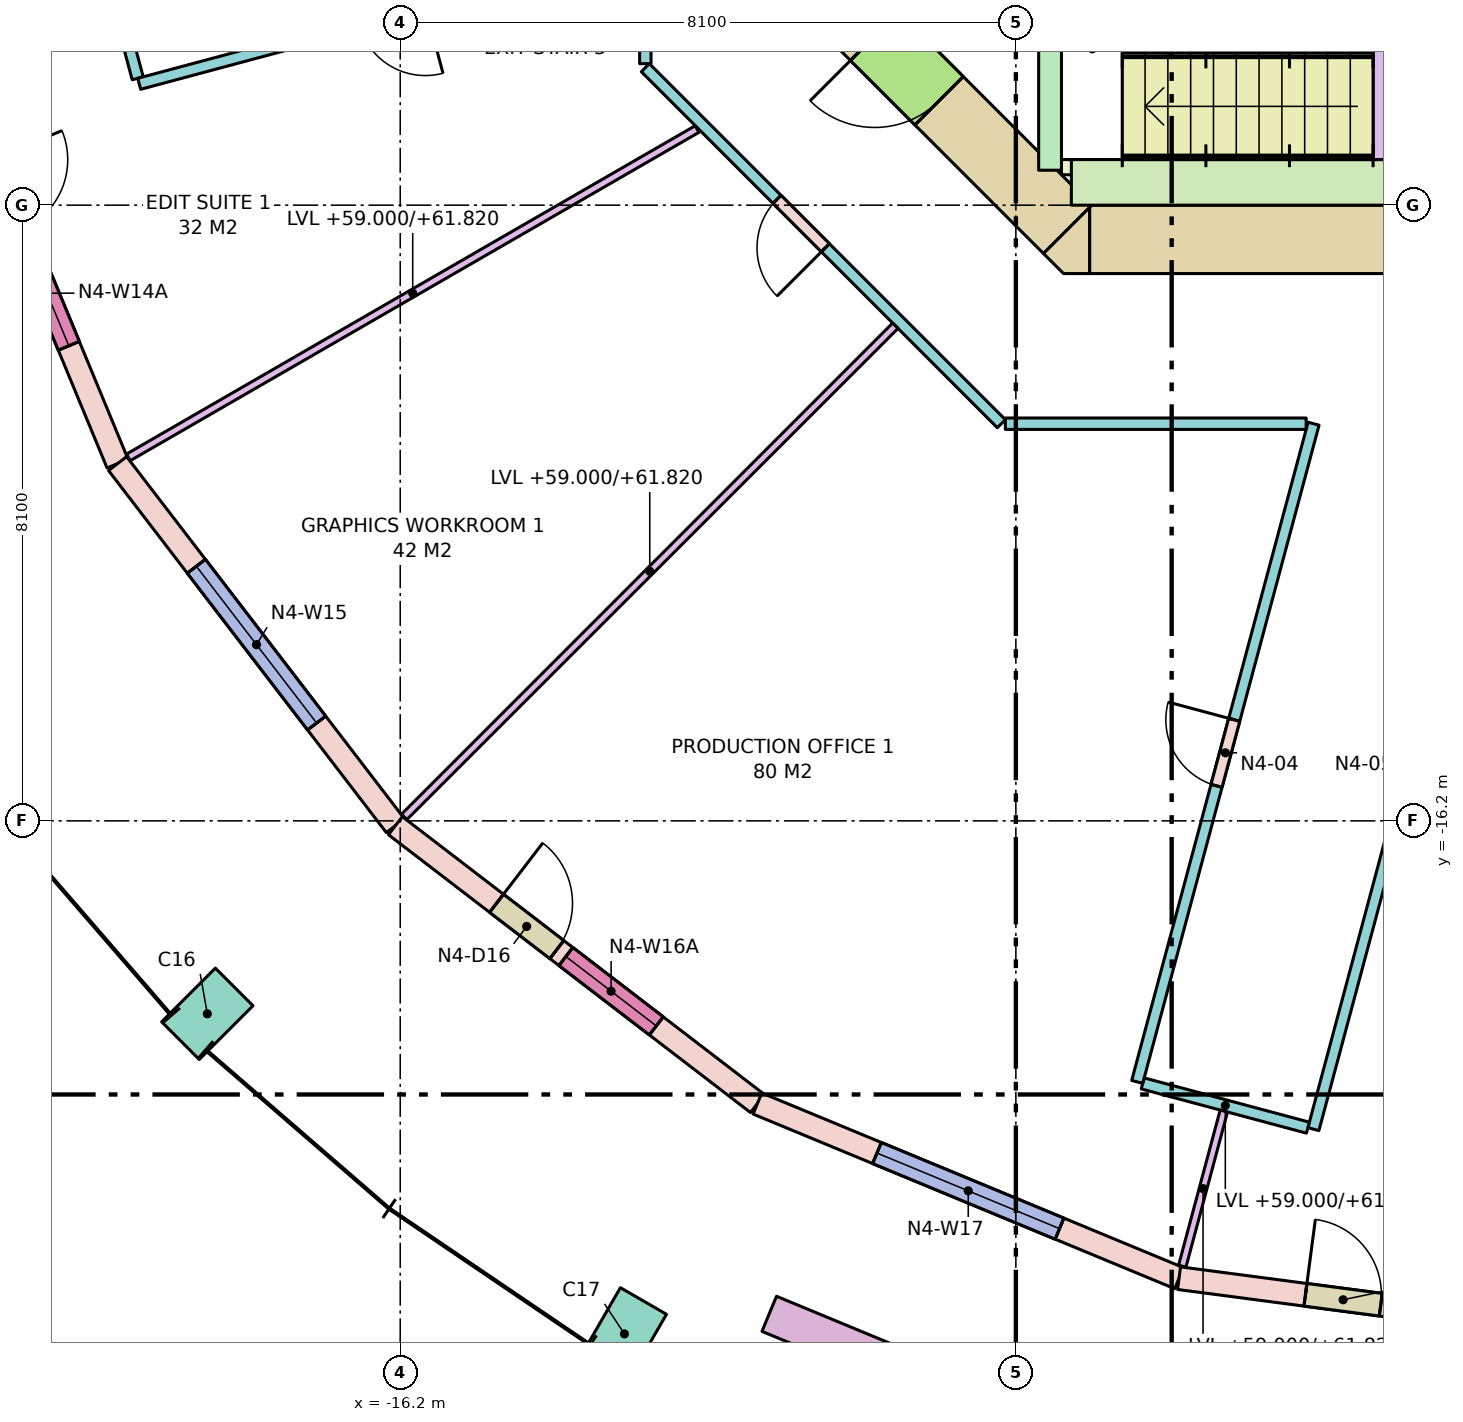
"""IFC4 building model, lengths in metres.
Left out: names, types, materials, properties, quantities, classifications, styles, units other than length and angle.
Written with IfcOpenShell. Run it as: python <this file> out.ifc"""

import sys

from ifc_helpers import new_model, si_unit, direction, frame, frame_2d, origin, origin_2d, place, context, subcontext, project, spatial, polyline, rectangle, outline, extrude, element, fill, save


model = new_model("IFC4")
c1 = context("Model", 3, precision=1e-05, world=origin(), true_north=direction((0.0, 1.0)))
c2 = subcontext(c1, "Body", "Model", "MODEL_VIEW")
j1 = project(units=[si_unit("LENGTHUNIT", "METRE"), si_unit("PLANEANGLEUNIT", "RADIAN")], contexts=[c1])
p1 = place(None, origin())
s1 = spatial("IfcSite", under=j1, at=p1, CompositionType="ELEMENT")
p2 = place(p1, origin())
s2 = spatial("IfcBuilding", under=s1, at=p2, CompositionType="ELEMENT")
p3 = place(p2, frame((0.0, 0.0, 59.0)))
s3 = spatial("IfcBuildingStorey", under=s2, at=p3, CompositionType="ELEMENT", Elevation=59.0)
for number, where, z_axis, x_axis in (
    (1, (-18.738, -18.738, 0.0), (0.0, 0.0, 1.0), (0.707, -0.707, 0.0)),
    (2, (-13.25, -22.95, 0.0), (0.0, 0.0, 1.0), (0.866, -0.5, 0.0)),
):
    element("IfcColumn", number, at=place(p3, frame(where, z_axis=z_axis, x_axis=x_axis)), inside=s3, PredefinedType="COLUMN", context=c2, shape_type="SweptSolid", body=[
        extrude(rectangle(XDim=0.7, YDim=1.0, at=origin_2d()), origin(), (0.0, 0.0, 1.0), 4.0),
    ])
p4 = place(p3, frame((-7.13, -8.55, -0.28), z_axis=(0.0, 0.0, 1.0), x_axis=(1.0, 0.0, 0.0)))
e3 = element("IfcWall", 3, at=p4, inside=s3, PredefinedType="SHEAR", context=c2, shape_type="SweptSolid", body=[
    extrude(rectangle(XDim=14.26, YDim=0.9, at=frame_2d((7.13, 0.0))), origin(), (0.0, 0.0, 1.0), 4.0),
])
p5 = place(p4, frame((8.08, 0.0, 0.28)))
e4 = element("IfcOpeningElement", 4, at=p5, cuts=e3, PredefinedType="OPENING", context=c2, shape_type="SweptSolid", body=[
    extrude(rectangle(XDim=0.7, YDim=2.1, at=frame_2d((0.35, 1.05))), frame((0.0, 0.46, 0.0), z_axis=(0.0, -1.0, 0.0), x_axis=(1.0, 0.0, 0.0)), (0.0, 0.0, 1.0), 0.92),
])
p6 = place(p4, frame((6.205, 0.0, 0.28)))
e5 = element("IfcOpeningElement", 5, at=p6, cuts=e3, PredefinedType="OPENING", context=c2, shape_type="SweptSolid", body=[
    extrude(rectangle(XDim=0.9, YDim=2.1, at=frame_2d((0.45, 1.05))), frame((0.0, 0.46, 0.0), z_axis=(0.0, -1.0, 0.0), x_axis=(1.0, 0.0, 0.0)), (0.0, 0.0, 1.0), 0.92),
])
p7 = place(p4, frame((9.445, 0.0, 0.28)))
e6 = element("IfcOpeningElement", 6, at=p7, cuts=e3, PredefinedType="OPENING", context=c2, shape_type="SweptSolid", body=[
    extrude(rectangle(XDim=0.9, YDim=2.1, at=frame_2d((0.45, 1.05))), frame((0.0, 0.46, 0.0), z_axis=(0.0, -1.0, 0.0), x_axis=(1.0, 0.0, 0.0)), (0.0, 0.0, 1.0), 0.92),
])
p8 = place(p4, frame((11.431, 0.0, 0.28)))
e7 = element("IfcOpeningElement", 7, at=p8, cuts=e3, PredefinedType="OPENING", context=c2, shape_type="SweptSolid", body=[
    extrude(rectangle(XDim=0.9, YDim=2.1, at=frame_2d((0.45, 1.05))), frame((0.0, 0.46, 0.0), z_axis=(0.0, -1.0, 0.0), x_axis=(1.0, 0.0, 0.0)), (0.0, 0.0, 1.0), 0.92),
])
p9 = place(p3, frame((-7.418, -8.418, -0.28), z_axis=(0.0, 0.0, 1.0), x_axis=(-0.707106781187, 0.707106781187, 0.0)))
e8 = element("IfcWall", 8, at=p9, inside=s3, PredefinedType="SHEAR", context=c2, shape_type="SweptSolid", body=[
    extrude(rectangle(XDim=4.243, YDim=0.9, at=frame_2d((2.121, 0.0))), origin(), (0.0, 0.0, 1.0), 4.0),
])
p10 = place(p9, frame((2.393, 0.0, 0.28)))
e9 = element("IfcOpeningElement", 9, at=p10, cuts=e8, PredefinedType="OPENING", context=c2, shape_type="SweptSolid", body=[
    extrude(rectangle(XDim=1.2, YDim=2.1, at=frame_2d((0.6, 1.05))), frame((0.0, 0.46, 0.0), z_axis=(0.0, -1.0, 0.0), x_axis=(1.0, 0.0, 0.0)), (0.0, 0.0, 1.0), 0.92),
])
p11 = place(p3, frame((0.0, 0.0, -0.28)))
e10 = element("IfcWall", 10, at=p11, inside=s3, PredefinedType="SHEAR", context=c2, shape_type="SweptSolid", body=[
    extrude(outline(polyline([(-7.473, -9.0), (-7.736, -8.736), (-7.13, -8.13), (-7.13, -9.0), (-7.473, -9.0)])), origin(), (0.0, 0.0, 1.0), 4.0),
])
p12 = place(p3, frame((-7.65, -7.64, 0.0), z_axis=(0.0, 0.0, 1.0), x_axis=(0.0, 1.0, 0.0)))
e11 = element("IfcWall", 11, at=p12, inside=s3, PredefinedType="SHEAR", context=c2, shape_type="SweptSolid", body=[
    extrude(rectangle(XDim=3.14, YDim=0.3, at=frame_2d((1.57, 0.0))), origin(), (0.0, 0.0, 1.0), 3.72),
])
p13 = place(p12, frame((1.68, 0.0, 0.0)))
e12 = element("IfcOpeningElement", 12, at=p13, cuts=e11, PredefinedType="OPENING", context=c2, shape_type="SweptSolid", body=[
    extrude(rectangle(XDim=1.32, YDim=2.1, at=frame_2d((0.66, 1.05))), frame((0.0, 0.16, 0.0), z_axis=(0.0, -1.0, 0.0), x_axis=(1.0, 0.0, 0.0)), (0.0, 0.0, 1.0), 0.32),
])
p14 = place(p3, frame((-7.5, -7.6, 0.0), z_axis=(0.0, 0.0, 1.0), x_axis=(1.0, 0.0, 0.0)))
e13 = element("IfcWall", 13, at=p14, inside=s3, PredefinedType="SHEAR", context=c2, shape_type="SweptSolid", body=[
    extrude(rectangle(XDim=0.6, YDim=0.2, at=frame_2d((0.3, 0.0))), origin(), (0.0, 0.0, 1.0), 3.72),
])
p15 = place(p3, frame((-7.37, -7.8, 0.0), z_axis=(0.0, 0.0, 1.0), x_axis=(1.0, 0.0, 0.0)))
e14 = element("IfcWall", 14, at=p15, inside=s3, PredefinedType="SHEAR", context=c2, shape_type="SweptSolid", body=[
    extrude(rectangle(XDim=5.37, YDim=0.6, at=frame_2d((2.685, 0.0))), origin(), (0.0, 0.0, 1.0), 3.72),
])
p16 = place(p3, frame((-22.216, -5.953, 0.0), z_axis=(0.0, 0.0, 1.0), x_axis=(0.382671411433, -0.923884511653, 0.0)))
e15 = element("IfcWall", 15, at=p16, inside=s3, PredefinedType="STANDARD", context=c2, shape_type="SweptSolid", body=[
    extrude(rectangle(XDim=6.004, YDim=0.3, at=frame_2d((3.002, 0.0))), origin(), (0.0, 0.0, 1.0), 3.72),
])
p17 = place(p16, frame((1.677, 0.0, 0.0)))
e16 = element("IfcOpeningElement", 16, at=p17, cuts=e15, PredefinedType="OPENING", context=c2, shape_type="SweptSolid", body=[
    extrude(rectangle(XDim=1.0, YDim=2.4, at=frame_2d((0.5, 1.2))), frame((0.0, 0.16, 0.0), z_axis=(0.0, -1.0, 0.0), x_axis=(1.0, 0.0, 0.0)), (0.0, 0.0, 1.0), 0.32),
])
p18 = place(p16, frame((2.827, 0.0, 0.8)))
e17 = element("IfcOpeningElement", 17, at=p18, cuts=e15, PredefinedType="OPENING", context=c2, shape_type="SweptSolid", body=[
    extrude(rectangle(XDim=1.5, YDim=2.7, at=frame_2d((0.75, 1.35))), frame((0.0, 0.16, 0.0), z_axis=(0.0, -1.0, 0.0), x_axis=(1.0, 0.0, 0.0)), (0.0, 0.0, 1.0), 0.32),
])
p19 = place(p3, frame((-19.919, -11.5, 0.0), z_axis=(0.0, 0.0, 1.0), x_axis=(0.608778912074, -0.793339924758, 0.0)))
e18 = element("IfcWall", 18, at=p19, inside=s3, PredefinedType="STANDARD", context=c2, shape_type="SweptSolid", body=[
    extrude(rectangle(XDim=6.004, YDim=0.3, at=frame_2d((3.002, 0.0))), origin(), (0.0, 0.0, 1.0), 3.72),
])
p20 = place(p19, frame((1.702, 0.0, 0.8)))
e19 = element("IfcOpeningElement", 19, at=p20, cuts=e18, PredefinedType="OPENING", context=c2, shape_type="SweptSolid", body=[
    extrude(rectangle(XDim=2.6, YDim=2.7, at=frame_2d((1.3, 1.35))), frame((0.0, 0.16, 0.0), z_axis=(0.0, -1.0, 0.0), x_axis=(1.0, 0.0, 0.0)), (0.0, 0.0, 1.0), 0.32),
])
p21 = place(p3, frame((-16.263, -16.263, 0.0), z_axis=(0.0, 0.0, 1.0), x_axis=(0.793339924758, -0.608778912074, 0.0)))
e20 = element("IfcWall", 20, at=p21, inside=s3, PredefinedType="STANDARD", context=c2, shape_type="SweptSolid", body=[
    extrude(rectangle(XDim=6.004, YDim=0.3, at=frame_2d((3.002, 0.0))), origin(), (0.0, 0.0, 1.0), 3.72),
])
p22 = place(p21, frame((1.677, 0.0, 0.0)))
e21 = element("IfcOpeningElement", 21, at=p22, cuts=e20, PredefinedType="OPENING", context=c2, shape_type="SweptSolid", body=[
    extrude(rectangle(XDim=1.0, YDim=2.4, at=frame_2d((0.5, 1.2))), frame((0.0, 0.16, 0.0), z_axis=(0.0, -1.0, 0.0), x_axis=(1.0, 0.0, 0.0)), (0.0, 0.0, 1.0), 0.32),
])
p23 = place(p21, frame((2.827, 0.0, 0.8)))
e22 = element("IfcOpeningElement", 22, at=p23, cuts=e20, PredefinedType="OPENING", context=c2, shape_type="SweptSolid", body=[
    extrude(rectangle(XDim=1.5, YDim=2.7, at=frame_2d((0.75, 1.35))), frame((0.0, 0.16, 0.0), z_axis=(0.0, -1.0, 0.0), x_axis=(1.0, 0.0, 0.0)), (0.0, 0.0, 1.0), 0.32),
])
p24 = place(p3, frame((-11.5, -19.919, 0.0), z_axis=(0.0, 0.0, 1.0), x_axis=(0.923884511653, -0.382671411433, 0.0)))
e23 = element("IfcWall", 23, at=p24, inside=s3, PredefinedType="STANDARD", context=c2, shape_type="SweptSolid", body=[
    extrude(rectangle(XDim=6.004, YDim=0.3, at=frame_2d((3.002, 0.0))), origin(), (0.0, 0.0, 1.0), 3.72),
])
p25 = place(p24, frame((1.702, 0.0, 0.8)))
e24 = element("IfcOpeningElement", 24, at=p25, cuts=e23, PredefinedType="OPENING", context=c2, shape_type="SweptSolid", body=[
    extrude(rectangle(XDim=2.6, YDim=2.7, at=frame_2d((1.3, 1.35))), frame((0.0, 0.16, 0.0), z_axis=(0.0, -1.0, 0.0), x_axis=(1.0, 0.0, 0.0)), (0.0, 0.0, 1.0), 0.32),
])
p26 = place(p3, frame((-5.953, -22.216, 0.0), z_axis=(0.0, 0.0, 1.0), x_axis=(0.991445297315, -0.130522880875, 0.0)))
e25 = element("IfcWall", 25, at=p26, inside=s3, PredefinedType="STANDARD", context=c2, shape_type="SweptSolid", body=[
    extrude(rectangle(XDim=6.004, YDim=0.3, at=frame_2d((3.002, 0.0))), origin(), (0.0, 0.0, 1.0), 3.72),
])
p27 = place(p26, frame((1.677, 0.0, 0.0)))
e26 = element("IfcOpeningElement", 26, at=p27, cuts=e25, PredefinedType="OPENING", context=c2, shape_type="SweptSolid", body=[
    extrude(rectangle(XDim=1.0, YDim=2.4, at=frame_2d((0.5, 1.2))), frame((0.0, 0.16, 0.0), z_axis=(0.0, -1.0, 0.0), x_axis=(1.0, 0.0, 0.0)), (0.0, 0.0, 1.0), 0.32),
])
p28 = place(p26, frame((2.827, 0.0, 0.8)))
e27 = element("IfcOpeningElement", 27, at=p28, cuts=e25, PredefinedType="OPENING", context=c2, shape_type="SweptSolid", body=[
    extrude(rectangle(XDim=1.5, YDim=2.7, at=frame_2d((0.75, 1.35))), frame((0.0, 0.16, 0.0), z_axis=(0.0, -1.0, 0.0), x_axis=(1.0, 0.0, 0.0)), (0.0, 0.0, 1.0), 0.32),
])
p29 = place(p3, frame((-11.345, -22.685, 0.0), z_axis=(0.0, 0.0, 1.0), x_axis=(0.923885420167, -0.382669217998, 0.0)))
e28 = element("IfcWall", 28, at=p29, inside=s3, PredefinedType="PARAPET", context=c2, shape_type="SweptSolid", body=[
    extrude(rectangle(XDim=3.6, YDim=0.5, at=frame_2d((1.8, 0.0))), origin(), (0.0, 0.0, 1.0), 0.9),
])
p30 = place(p3, frame((-19.654, -6.431, 0.0), z_axis=(0.0, 0.0, 1.0), x_axis=(-0.258891558609, 0.965906393436, 0.0)))
e29 = element("IfcWall", 29, at=p30, inside=s3, PredefinedType="PARTITIONING", context=c2, shape_type="SweptSolid", body=[
    extrude(rectangle(XDim=2.25, YDim=0.15, at=frame_2d((1.125, 0.0))), origin(), (0.0, 0.0, 1.0), 2.82),
])
p31 = place(p3, frame((-1.698, -10.975, 0.0), z_axis=(0.0, 0.0, 1.0), x_axis=(-0.258829650889, -0.965922984415, 0.0)))
e30 = element("IfcWall", 30, at=p31, inside=s3, PredefinedType="PARTITIONING", context=c2, shape_type="SweptSolid", body=[
    extrude(rectangle(XDim=9.608, YDim=0.15, at=frame_2d((4.804, 0.0))), origin(), (0.0, 0.0, 1.0), 3.72),
])
p32 = place(p31, frame((3.904, 0.0, 0.0)))
e31 = element("IfcOpeningElement", 31, at=p32, cuts=e30, PredefinedType="OPENING", context=c2, shape_type="SweptSolid", body=[
    extrude(rectangle(XDim=1.8, YDim=2.1, at=frame_2d((0.9, 1.05))), frame((0.0, 0.085, 0.0), z_axis=(0.0, -1.0, 0.0), x_axis=(1.0, 0.0, 0.0)), (0.0, 0.0, 1.0), 0.17),
])
p33 = place(p3, frame((-4.258, -20.236, 0.0), z_axis=(0.0, 0.0, 1.0), x_axis=(-0.965906393436, 0.258891558609, 0.0)))
e32 = element("IfcWall", 32, at=p33, inside=s3, PredefinedType="PARTITIONING", context=c2, shape_type="SweptSolid", body=[
    extrude(rectangle(XDim=2.25, YDim=0.15, at=frame_2d((1.125, 0.0))), origin(), (0.0, 0.0, 1.0), 2.82),
])
p34 = place(p3, frame((-6.503, -19.635, 0.0), z_axis=(0.0, 0.0, 1.0), x_axis=(0.258821842436, 0.965925076742, 0.0)))
e33 = element("IfcWall", 33, at=p34, inside=s3, PredefinedType="PARTITIONING", context=c2, shape_type="SweptSolid", body=[
    extrude(rectangle(XDim=8.965, YDim=0.15, at=frame_2d((4.482, 0.0))), origin(), (0.0, 0.0, 1.0), 3.72),
])
p35 = place(p34, frame((4.032, 0.0, 0.0)))
e34 = element("IfcOpeningElement", 34, at=p35, cuts=e33, PredefinedType="OPENING", context=c2, shape_type="SweptSolid", body=[
    extrude(rectangle(XDim=0.9, YDim=2.1, at=frame_2d((0.45, 1.05))), frame((0.0, 0.085, 0.0), z_axis=(0.0, -1.0, 0.0), x_axis=(1.0, 0.0, 0.0)), (0.0, 0.0, 1.0), 0.17),
])
p36 = place(p3, frame((-4.281, -10.975, 0.0), z_axis=(0.0, 0.0, 1.0), x_axis=(-1.0, 0.0, 0.0)))
e35 = element("IfcWall", 35, at=p36, inside=s3, PredefinedType="PARTITIONING", context=c2, shape_type="SweptSolid", body=[
    extrude(rectangle(XDim=3.958, YDim=0.15, at=frame_2d((1.979, 0.0))), origin(), (0.0, 0.0, 1.0), 2.82),
])
p37 = place(p3, frame((-8.291, -10.975, 0.0), z_axis=(0.0, 0.0, 1.0), x_axis=(-0.707106781187, 0.707106781187, 0.0)))
e36 = element("IfcWall", 36, at=p37, inside=s3, PredefinedType="PARTITIONING", context=c2, shape_type="SweptSolid", body=[
    extrude(rectangle(XDim=6.624, YDim=0.15, at=frame_2d((3.312, 0.0))), origin(), (0.0, 0.0, 1.0), 2.82),
])
p38 = place(p37, frame((3.274, 0.0, 0.0)))
e37 = element("IfcOpeningElement", 37, at=p38, cuts=e36, PredefinedType="OPENING", context=c2, shape_type="SweptSolid", body=[
    extrude(rectangle(XDim=0.9, YDim=2.1, at=frame_2d((0.45, 1.05))), frame((0.0, 0.085, 0.0), z_axis=(0.0, -1.0, 0.0), x_axis=(1.0, 0.0, 0.0)), (0.0, 0.0, 1.0), 0.17),
])
p39 = place(p3, frame((-12.975, -6.238, 0.0), z_axis=(0.0, 0.0, 1.0), x_axis=(0.0, 1.0, 0.0)))
e38 = element("IfcWall", 38, at=p39, inside=s3, PredefinedType="PARTITIONING", context=c2, shape_type="SweptSolid", body=[
    extrude(rectangle(XDim=1.422, YDim=0.15, at=frame_2d((0.711, 0.0))), origin(), (0.0, 0.0, 1.0), 3.72),
])
p40 = place(p3, frame((-12.975, -4.719, 0.0), z_axis=(0.0, 0.0, 1.0), x_axis=(-0.965924499418, -0.258823997003, 0.0)))
e39 = element("IfcWall", 39, at=p40, inside=s3, PredefinedType="PARTITIONING", context=c2, shape_type="SweptSolid", body=[
    extrude(rectangle(XDim=6.894, YDim=0.15, at=frame_2d((3.447, 0.0))), origin(), (0.0, 0.0, 1.0), 3.72),
])
p41 = place(p40, frame((2.997, 0.0, 0.0)))
e40 = element("IfcOpeningElement", 40, at=p41, cuts=e39, PredefinedType="OPENING", context=c2, shape_type="SweptSolid", body=[
    extrude(rectangle(XDim=0.9, YDim=2.1, at=frame_2d((0.45, 1.05))), frame((0.0, 0.085, 0.0), z_axis=(0.0, -1.0, 0.0), x_axis=(1.0, 0.0, 0.0)), (0.0, 0.0, 1.0), 0.17),
])
p42 = place(p3, frame((-12.294, -7.098, 0.0), z_axis=(0.0, 0.0, 1.0), x_axis=(-0.866010547425, -0.500025731086, 0.0)))
e41 = element("IfcWall", 41, at=p42, inside=s3, PredefinedType="PARTITIONING", context=c2, shape_type="SweptSolid", body=[
    extrude(rectangle(XDim=8.641, YDim=0.1, at=frame_2d((4.32, 0.0))), origin(), (0.0, 0.0, 1.0), 2.82),
])
p43 = place(p3, frame((-9.686, -9.686, 0.0), z_axis=(0.0, 0.0, 1.0), x_axis=(-0.707106781187, -0.707106781187, 0.0)))
e42 = element("IfcWall", 42, at=p43, inside=s3, PredefinedType="PARTITIONING", context=c2, shape_type="SweptSolid", body=[
    extrude(rectangle(XDim=9.138, YDim=0.1, at=frame_2d((4.569, 0.0))), origin(), (0.0, 0.0, 1.0), 2.82),
])
p44 = place(p3, frame((-5.364, -20.018, 0.0), z_axis=(0.0, 0.0, 1.0), x_axis=(-0.258813089189, -0.965927422152, 0.0)))
e43 = element("IfcWall", 43, at=p44, inside=s3, PredefinedType="PARTITIONING", context=c2, shape_type="SweptSolid", body=[
    extrude(rectangle(XDim=2.113, YDim=0.1, at=frame_2d((1.057, 0.0))), origin(), (0.0, 0.0, 1.0), 2.82),
])
p45 = place(p18, origin())
e44 = element("IfcWindow", 44, at=p45, inside=s3, PartitioningType="SINGLE_PANEL", PredefinedType="WINDOW", context=c2, shape_type="SweptSolid", body=[
    extrude(rectangle(XDim=1.5, YDim=2.7, at=frame_2d((0.75, 1.35))), frame((0.0, 0.03, 0.0), z_axis=(0.0, -1.0, 0.0), x_axis=(1.0, 0.0, 0.0)), (0.0, 0.0, 1.0), 0.06),
])
fill(e17, e44)
p46 = place(p20, origin())
e45 = element("IfcWindow", 45, at=p46, inside=s3, PartitioningType="SINGLE_PANEL", PredefinedType="WINDOW", context=c2, shape_type="SweptSolid", body=[
    extrude(rectangle(XDim=2.6, YDim=2.7, at=frame_2d((1.3, 1.35))), frame((0.0, 0.03, 0.0), z_axis=(0.0, -1.0, 0.0), x_axis=(1.0, 0.0, 0.0)), (0.0, 0.0, 1.0), 0.06),
])
fill(e19, e45)
p47 = place(p22, origin())
e46 = element("IfcDoor", 46, at=p47, inside=s3, OperationType="SINGLE_SWING_LEFT", PredefinedType="DOOR", context=c2, shape_type="SweptSolid", body=[
    extrude(rectangle(XDim=1.0, YDim=2.4, at=frame_2d((0.5, 1.2))), frame((0.0, 0.025, 0.0), z_axis=(0.0, -1.0, 0.0), x_axis=(1.0, 0.0, 0.0)), (0.0, 0.0, 1.0), 0.05),
])
fill(e21, e46)
p48 = place(p23, origin())
e47 = element("IfcWindow", 47, at=p48, inside=s3, PartitioningType="SINGLE_PANEL", PredefinedType="WINDOW", context=c2, shape_type="SweptSolid", body=[
    extrude(rectangle(XDim=1.5, YDim=2.7, at=frame_2d((0.75, 1.35))), frame((0.0, 0.03, 0.0), z_axis=(0.0, -1.0, 0.0), x_axis=(1.0, 0.0, 0.0)), (0.0, 0.0, 1.0), 0.06),
])
fill(e22, e47)
p49 = place(p25, origin())
e48 = element("IfcWindow", 48, at=p49, inside=s3, PartitioningType="SINGLE_PANEL", PredefinedType="WINDOW", context=c2, shape_type="SweptSolid", body=[
    extrude(rectangle(XDim=2.6, YDim=2.7, at=frame_2d((1.3, 1.35))), frame((0.0, 0.03, 0.0), z_axis=(0.0, -1.0, 0.0), x_axis=(1.0, 0.0, 0.0)), (0.0, 0.0, 1.0), 0.06),
])
fill(e24, e48)
p50 = place(p27, origin())
e49 = element("IfcDoor", 49, at=p50, inside=s3, OperationType="SINGLE_SWING_LEFT", PredefinedType="DOOR", context=c2, shape_type="SweptSolid", body=[
    extrude(rectangle(XDim=1.0, YDim=2.4, at=frame_2d((0.5, 1.2))), frame((0.0, 0.025, 0.0), z_axis=(0.0, -1.0, 0.0), x_axis=(1.0, 0.0, 0.0)), (0.0, 0.0, 1.0), 0.05),
])
fill(e26, e49)
p51 = place(p10, origin())
e50 = element("IfcDoor", 50, at=p51, inside=s3, OperationType="SINGLE_SWING_RIGHT", PredefinedType="DOOR", context=c2, shape_type="SweptSolid", body=[
    extrude(rectangle(XDim=1.2, YDim=2.1, at=frame_2d((0.6, 1.05))), frame((0.0, 0.025, 0.0), z_axis=(0.0, -1.0, 0.0), x_axis=(1.0, 0.0, 0.0)), (0.0, 0.0, 1.0), 0.05),
])
fill(e9, e50)
p52 = place(p38, origin())
e51 = element("IfcDoor", 51, at=p52, inside=s3, OperationType="SINGLE_SWING_LEFT", PredefinedType="DOOR", context=c2, shape_type="SweptSolid", body=[
    extrude(rectangle(XDim=0.9, YDim=2.1, at=frame_2d((0.45, 1.05))), frame((0.0, 0.025, 0.0), z_axis=(0.0, -1.0, 0.0), x_axis=(1.0, 0.0, 0.0)), (0.0, 0.0, 1.0), 0.05),
])
fill(e37, e51)
p53 = place(p35, origin())
e52 = element("IfcDoor", 52, at=p53, inside=s3, OperationType="SINGLE_SWING_RIGHT", PredefinedType="DOOR", context=c2, shape_type="SweptSolid", body=[
    extrude(rectangle(XDim=0.9, YDim=2.1, at=frame_2d((0.45, 1.05))), frame((0.0, 0.025, 0.0), z_axis=(0.0, -1.0, 0.0), x_axis=(1.0, 0.0, 0.0)), (0.0, 0.0, 1.0), 0.05),
])
fill(e34, e52)
save(model, sys.argv[1])
